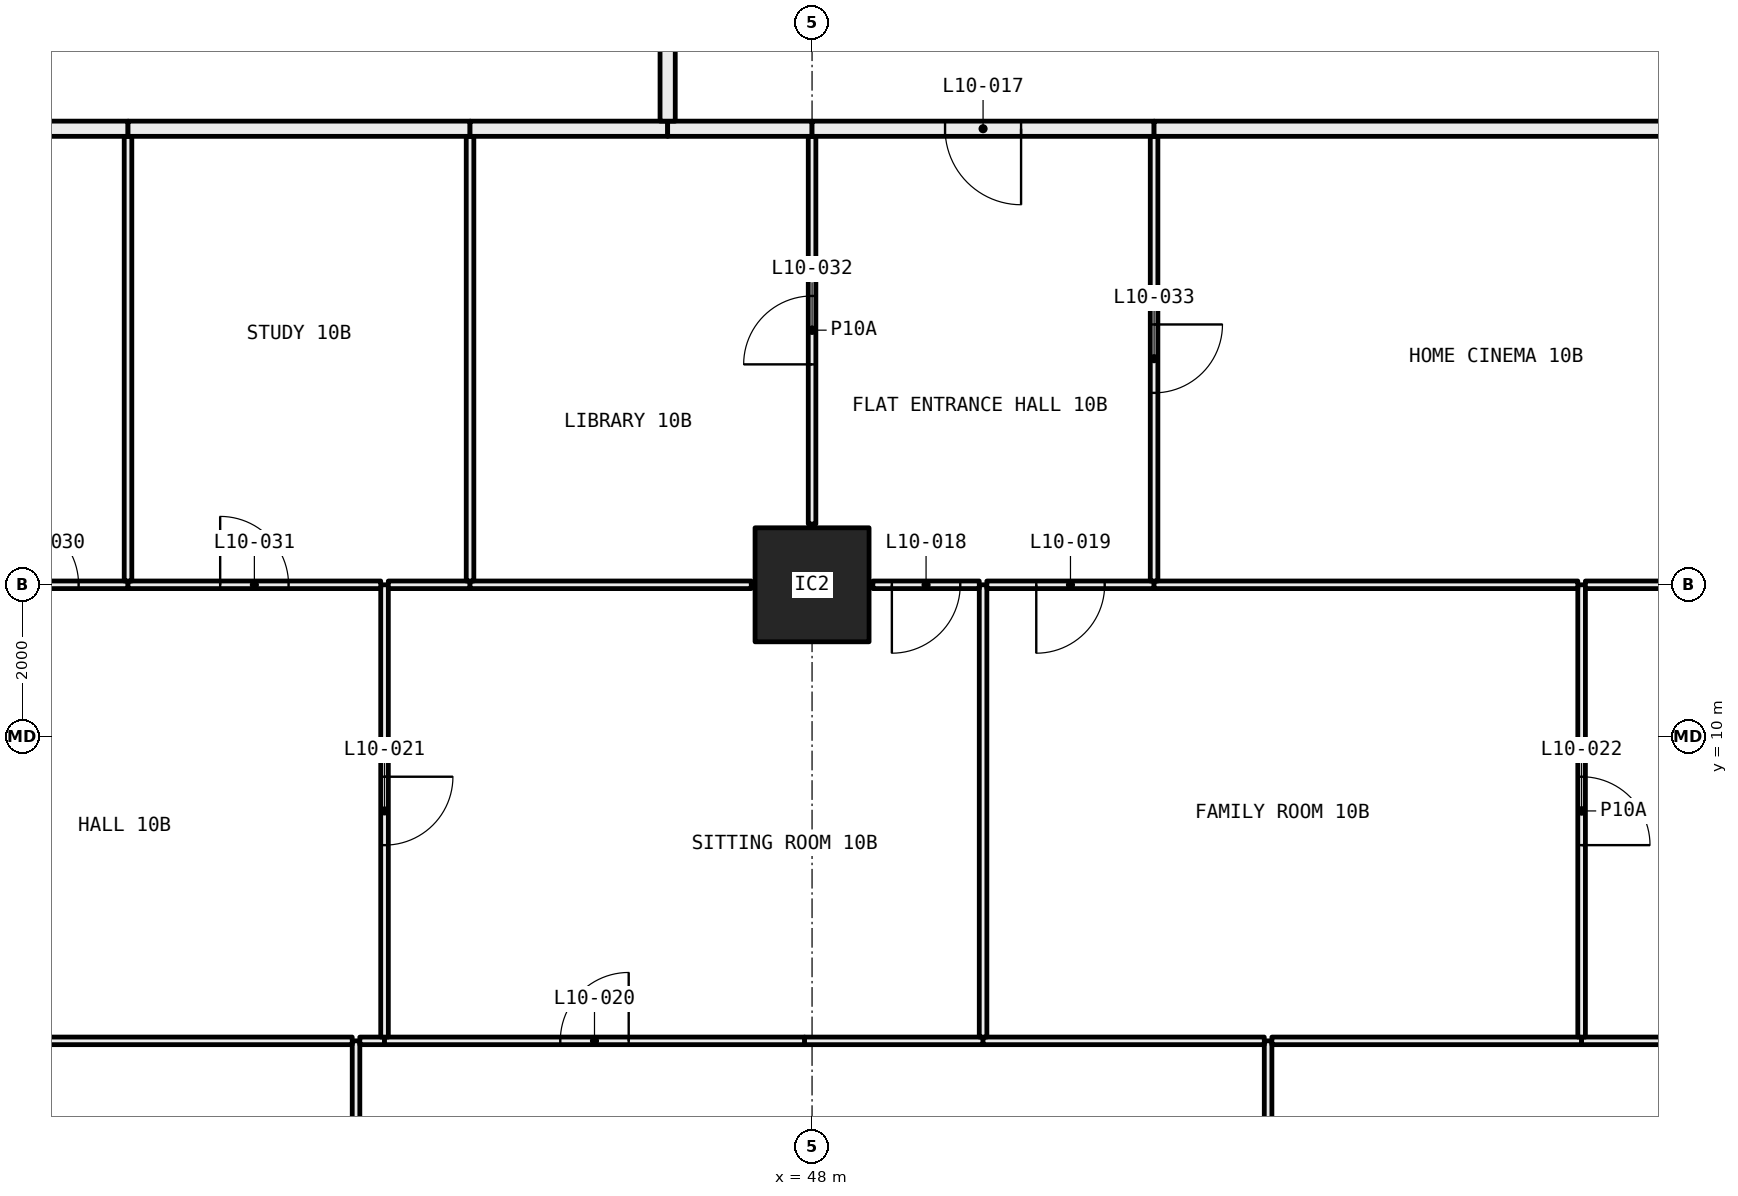
"""IFC4 building model, lengths in metres.
Left out: names, types, materials, properties, quantities, classifications, styles, units other than length and angle.
Written with IfcOpenShell. Run it as: python <this file> out.ifc"""

import sys

from ifc_helpers import new_model, si_unit, direction, frame, frame_2d, origin, origin_2d, place, context, subcontext, project, spatial, rectangle, hollow_rectangle, extrude, element, fill, save


model = new_model("IFC4")
c1 = context("Model", 3, precision=1e-05, world=origin(), true_north=direction((0.0, 1.0)))
c2 = subcontext(c1, "Body", "Model", "MODEL_VIEW")
j1 = project(units=[si_unit("LENGTHUNIT", "METRE"), si_unit("PLANEANGLEUNIT", "RADIAN")], contexts=[c1])
p1 = place(None, origin())
s1 = spatial("IfcSite", under=j1, at=p1, CompositionType="ELEMENT")
p2 = place(p1, origin())
s2 = spatial("IfcBuilding", under=s1, at=p2, CompositionType="ELEMENT")
p3 = place(p2, frame((0.0, 0.0, 47.25)))
s3 = spatial("IfcBuildingStorey", under=s2, at=p3, CompositionType="ELEMENT", Elevation=47.25)
p4 = place(p3, frame((48.0, 12.0, 0.0), z_axis=(0.0, 0.0, 1.0), x_axis=(1.0, 0.0, 0.0)))
e1 = element("IfcColumn", 1, at=p4, inside=s3, PredefinedType="COLUMN", context=c2, shape_type="SweptSolid", body=[
    extrude(hollow_rectangle(XDim=1.5, YDim=1.5, WallThickness=0.065, at=origin_2d()), origin(), (0.0, 0.0, 1.0), 3.05),
])
p5 = place(p3, frame((42.0, 0.72, 0.0), z_axis=(0.0, 0.0, 1.0), x_axis=(0.0, 1.0, 0.0)))
e2 = element("IfcWall", 2, at=p5, inside=s3, PredefinedType="PARTITIONING", context=c2, shape_type="SweptSolid", body=[
    extrude(rectangle(XDim=5.28, YDim=0.1, at=frame_2d((2.64, 0.0))), origin(), (0.0, 0.0, 1.0), 3.05),
])
p6 = place(p5, frame((2.19, 0.0, 0.0)))
e3 = element("IfcOpeningElement", 3, at=p6, cuts=e2, PredefinedType="OPENING", context=c2, shape_type="SweptSolid", body=[
    extrude(rectangle(XDim=0.9, YDim=2.1, at=frame_2d((0.45, 1.05))), frame((0.0, 0.06, 0.0), z_axis=(0.0, -1.0, 0.0), x_axis=(1.0, 0.0, 0.0)), (0.0, 0.0, 1.0), 0.12),
])
p7 = place(p3, frame((41.95, 6.0, 0.0), z_axis=(0.0, 0.0, 1.0), x_axis=(-1.0, 0.0, 0.0)))
e4 = element("IfcWall", 4, at=p7, inside=s3, PredefinedType="PARTITIONING", context=c2, shape_type="SweptSolid", body=[
    extrude(rectangle(XDim=5.9, YDim=0.1, at=frame_2d((2.95, 0.0))), origin(), (0.0, 0.0, 1.0), 2.45),
])
p8 = place(p3, frame((54.0, 0.72, 0.0), z_axis=(0.0, 0.0, 1.0), x_axis=(0.0, 1.0, 0.0)))
e5 = element("IfcWall", 5, at=p8, inside=s3, PredefinedType="PARTITIONING", context=c2, shape_type="SweptSolid", body=[
    extrude(rectangle(XDim=5.28, YDim=0.1, at=frame_2d((2.64, 0.0))), origin(), (0.0, 0.0, 1.0), 3.05),
])
p9 = place(p8, frame((2.19, 0.0, 0.0)))
e6 = element("IfcOpeningElement", 6, at=p9, cuts=e5, PredefinedType="OPENING", context=c2, shape_type="SweptSolid", body=[
    extrude(rectangle(XDim=0.9, YDim=2.1, at=frame_2d((0.45, 1.05))), frame((0.0, 0.06, 0.0), z_axis=(0.0, -1.0, 0.0), x_axis=(1.0, 0.0, 0.0)), (0.0, 0.0, 1.0), 0.12),
])
p10 = place(p3, frame((42.375, 6.0, 0.0), z_axis=(0.0, 0.0, 1.0), x_axis=(-1.0, 0.0, 0.0)))
e7 = element("IfcWall", 7, at=p10, inside=s3, PredefinedType="PARTITIONING", context=c2, shape_type="SweptSolid", body=[
    extrude(rectangle(XDim=0.325, YDim=0.1, at=frame_2d((0.163, 0.0))), origin(), (0.0, 0.0, 1.0), 3.05),
])
p11 = place(p3, frame((50.25, 6.0, 0.0), z_axis=(0.0, 0.0, 1.0), x_axis=(-1.0, 0.0, 0.0)))
e8 = element("IfcWall", 8, at=p11, inside=s3, PredefinedType="PARTITIONING", context=c2, shape_type="SweptSolid", body=[
    extrude(rectangle(XDim=2.35, YDim=0.1, at=frame_2d((1.175, 0.0))), origin(), (0.0, 0.0, 1.0), 2.45),
])
p12 = place(p3, frame((47.9, 6.0, 0.0), z_axis=(0.0, 0.0, 1.0), x_axis=(-1.0, 0.0, 0.0)))
e9 = element("IfcWall", 9, at=p12, inside=s3, PredefinedType="PARTITIONING", context=c2, shape_type="SweptSolid", body=[
    extrude(rectangle(XDim=5.525, YDim=0.1, at=frame_2d((2.762, 0.0))), origin(), (0.0, 0.0, 1.0), 3.05),
])
p13 = place(p12, frame((2.312, 0.0, 0.0)))
e10 = element("IfcOpeningElement", 10, at=p13, cuts=e9, PredefinedType="OPENING", context=c2, shape_type="SweptSolid", body=[
    extrude(rectangle(XDim=0.9, YDim=2.1, at=frame_2d((0.45, 1.05))), frame((0.0, 0.06, 0.0), z_axis=(0.0, -1.0, 0.0), x_axis=(1.0, 0.0, 0.0)), (0.0, 0.0, 1.0), 0.12),
])
p14 = place(p3, frame((53.95, 6.0, 0.0), z_axis=(0.0, 0.0, 1.0), x_axis=(-1.0, 0.0, 0.0)))
e11 = element("IfcWall", 11, at=p14, inside=s3, PredefinedType="PARTITIONING", context=c2, shape_type="SweptSolid", body=[
    extrude(rectangle(XDim=3.7, YDim=0.1, at=frame_2d((1.85, 0.0))), origin(), (0.0, 0.0, 1.0), 3.05),
])
p15 = place(p3, frame((58.125, 6.0, 0.0), z_axis=(0.0, 0.0, 1.0), x_axis=(-1.0, 0.0, 0.0)))
e12 = element("IfcWall", 12, at=p15, inside=s3, PredefinedType="PARTITIONING", context=c2, shape_type="SweptSolid", body=[
    extrude(rectangle(XDim=4.075, YDim=0.1, at=frame_2d((2.038, 0.0))), origin(), (0.0, 0.0, 1.0), 3.05),
])
p16 = place(p3, frame((59.95, 6.0, 0.0), z_axis=(0.0, 0.0, 1.0), x_axis=(-1.0, 0.0, 0.0)))
e13 = element("IfcWall", 13, at=p16, inside=s3, PredefinedType="PARTITIONING", context=c2, shape_type="SweptSolid", body=[
    extrude(rectangle(XDim=1.825, YDim=0.1, at=frame_2d((0.913, 0.0))), origin(), (0.0, 0.0, 1.0), 2.45),
])
p17 = place(p3, frame((42.375, 6.05, 0.0), z_axis=(0.0, 0.0, 1.0), x_axis=(0.0, 1.0, 0.0)))
e14 = element("IfcWall", 14, at=p17, inside=s3, PredefinedType="PARTITIONING", context=c2, shape_type="SweptSolid", body=[
    extrude(rectangle(XDim=5.95, YDim=0.1, at=frame_2d((2.975, 0.0))), origin(), (0.0, 0.0, 1.0), 2.45),
])
p18 = place(p17, frame((2.525, 0.0, 0.0)))
e15 = element("IfcOpeningElement", 15, at=p18, cuts=e14, PredefinedType="OPENING", context=c2, shape_type="SweptSolid", body=[
    extrude(rectangle(XDim=0.9, YDim=2.1, at=frame_2d((0.45, 1.05))), frame((0.0, 0.06, 0.0), z_axis=(0.0, -1.0, 0.0), x_axis=(1.0, 0.0, 0.0)), (0.0, 0.0, 1.0), 0.12),
])
p19 = place(p3, frame((39.0, 12.0, 0.0), z_axis=(0.0, 0.0, 1.0), x_axis=(-1.0, 0.0, 0.0)))
e16 = element("IfcWall", 16, at=p19, inside=s3, PredefinedType="PARTITIONING", context=c2, shape_type="SweptSolid", body=[
    extrude(rectangle(XDim=2.2, YDim=0.1, at=frame_2d((1.1, 0.0))), origin(), (0.0, 0.0, 1.0), 2.45),
])
p20 = place(p19, frame((0.65, 0.0, 0.0)))
e17 = element("IfcOpeningElement", 17, at=p20, cuts=e16, PredefinedType="OPENING", context=c2, shape_type="SweptSolid", body=[
    extrude(rectangle(XDim=0.9, YDim=2.1, at=frame_2d((0.45, 1.05))), frame((0.0, 0.06, 0.0), z_axis=(0.0, -1.0, 0.0), x_axis=(1.0, 0.0, 0.0)), (0.0, 0.0, 1.0), 0.12),
])
p21 = place(p3, frame((42.325, 12.0, 0.0), z_axis=(0.0, 0.0, 1.0), x_axis=(-1.0, 0.0, 0.0)))
e18 = element("IfcWall", 18, at=p21, inside=s3, PredefinedType="PARTITIONING", context=c2, shape_type="SweptSolid", body=[
    extrude(rectangle(XDim=3.325, YDim=0.1, at=frame_2d((1.663, 0.0))), origin(), (0.0, 0.0, 1.0), 2.45),
])
p22 = place(p21, frame((1.212, 0.0, 0.0)))
e19 = element("IfcOpeningElement", 19, at=p22, cuts=e18, PredefinedType="OPENING", context=c2, shape_type="SweptSolid", body=[
    extrude(rectangle(XDim=0.9, YDim=2.1, at=frame_2d((0.45, 1.05))), frame((0.0, 0.06, 0.0), z_axis=(0.0, -1.0, 0.0), x_axis=(1.0, 0.0, 0.0)), (0.0, 0.0, 1.0), 0.12),
])
p23 = place(p3, frame((50.25, 6.05, 0.0), z_axis=(0.0, 0.0, 1.0), x_axis=(0.0, 1.0, 0.0)))
e20 = element("IfcWall", 20, at=p23, inside=s3, PredefinedType="PARTITIONING", context=c2, shape_type="SweptSolid", body=[
    extrude(rectangle(XDim=5.95, YDim=0.1, at=frame_2d((2.975, 0.0))), origin(), (0.0, 0.0, 1.0), 2.45),
])
p24 = place(p3, frame((43.5, 12.0, 0.0), z_axis=(0.0, 0.0, 1.0), x_axis=(-1.0, 0.0, 0.0)))
e21 = element("IfcWall", 21, at=p24, inside=s3, PredefinedType="PARTITIONING", context=c2, shape_type="SweptSolid", body=[
    extrude(rectangle(XDim=1.075, YDim=0.1, at=frame_2d((0.538, 0.0))), origin(), (0.0, 0.0, 1.0), 2.45),
])
p25 = place(p3, frame((47.2, 12.0, 0.0), z_axis=(0.0, 0.0, 1.0), x_axis=(-1.0, 0.0, 0.0)))
e22 = element("IfcWall", 22, at=p25, inside=s3, PredefinedType="PARTITIONING", context=c2, shape_type="SweptSolid", body=[
    extrude(rectangle(XDim=3.7, YDim=0.1, at=frame_2d((1.85, 0.0))), origin(), (0.0, 0.0, 1.0), 2.45),
])
p26 = place(p3, frame((50.2, 12.0, 0.0), z_axis=(0.0, 0.0, 1.0), x_axis=(-1.0, 0.0, 0.0)))
e23 = element("IfcWall", 23, at=p26, inside=s3, PredefinedType="PARTITIONING", context=c2, shape_type="SweptSolid", body=[
    extrude(rectangle(XDim=1.4, YDim=0.1, at=frame_2d((0.7, 0.0))), origin(), (0.0, 0.0, 1.0), 2.45),
])
p27 = place(p26, frame((0.25, 0.0, 0.0)))
e24 = element("IfcOpeningElement", 24, at=p27, cuts=e23, PredefinedType="OPENING", context=c2, shape_type="SweptSolid", body=[
    extrude(rectangle(XDim=0.9, YDim=2.1, at=frame_2d((0.45, 1.05))), frame((0.0, 0.06, 0.0), z_axis=(0.0, -1.0, 0.0), x_axis=(1.0, 0.0, 0.0)), (0.0, 0.0, 1.0), 0.12),
])
p28 = place(p3, frame((58.125, 6.05, 0.0), z_axis=(0.0, 0.0, 1.0), x_axis=(0.0, 1.0, 0.0)))
e25 = element("IfcWall", 25, at=p28, inside=s3, PredefinedType="PARTITIONING", context=c2, shape_type="SweptSolid", body=[
    extrude(rectangle(XDim=5.95, YDim=0.1, at=frame_2d((2.975, 0.0))), origin(), (0.0, 0.0, 1.0), 2.45),
])
p29 = place(p28, frame((2.525, 0.0, 0.0)))
e26 = element("IfcOpeningElement", 26, at=p29, cuts=e25, PredefinedType="OPENING", context=c2, shape_type="SweptSolid", body=[
    extrude(rectangle(XDim=0.9, YDim=2.1, at=frame_2d((0.45, 1.05))), frame((0.0, 0.06, 0.0), z_axis=(0.0, -1.0, 0.0), x_axis=(1.0, 0.0, 0.0)), (0.0, 0.0, 1.0), 0.12),
])
p30 = place(p3, frame((52.5, 12.0, 0.0), z_axis=(0.0, 0.0, 1.0), x_axis=(-1.0, 0.0, 0.0)))
e27 = element("IfcWall", 27, at=p30, inside=s3, PredefinedType="PARTITIONING", context=c2, shape_type="SweptSolid", body=[
    extrude(rectangle(XDim=2.2, YDim=0.1, at=frame_2d((1.1, 0.0))), origin(), (0.0, 0.0, 1.0), 2.45),
])
p31 = place(p30, frame((0.65, 0.0, 0.0)))
e28 = element("IfcOpeningElement", 28, at=p31, cuts=e27, PredefinedType="OPENING", context=c2, shape_type="SweptSolid", body=[
    extrude(rectangle(XDim=0.9, YDim=2.1, at=frame_2d((0.45, 1.05))), frame((0.0, 0.06, 0.0), z_axis=(0.0, -1.0, 0.0), x_axis=(1.0, 0.0, 0.0)), (0.0, 0.0, 1.0), 0.12),
])
p32 = place(p3, frame((58.075, 12.0, 0.0), z_axis=(0.0, 0.0, 1.0), x_axis=(-1.0, 0.0, 0.0)))
e29 = element("IfcWall", 29, at=p32, inside=s3, PredefinedType="PARTITIONING", context=c2, shape_type="SweptSolid", body=[
    extrude(rectangle(XDim=5.575, YDim=0.1, at=frame_2d((2.788, 0.0))), origin(), (0.0, 0.0, 1.0), 2.45),
])
p33 = place(p3, frame((59.2, 12.0, 0.0), z_axis=(0.0, 0.0, 1.0), x_axis=(-1.0, 0.0, 0.0)))
e30 = element("IfcWall", 30, at=p33, inside=s3, PredefinedType="PARTITIONING", context=c2, shape_type="SweptSolid", body=[
    extrude(rectangle(XDim=1.025, YDim=0.1, at=frame_2d((0.512, 0.0))), origin(), (0.0, 0.0, 1.0), 2.45),
])
p34 = place(p3, frame((39.0, 12.05, 0.0), z_axis=(0.0, 0.0, 1.0), x_axis=(0.0, 1.0, 0.0)))
e31 = element("IfcWall", 31, at=p34, inside=s3, PredefinedType="PARTITIONING", context=c2, shape_type="SweptSolid", body=[
    extrude(rectangle(XDim=5.85, YDim=0.1, at=frame_2d((2.925, 0.0))), origin(), (0.0, 0.0, 1.0), 2.45),
])
p35 = place(p3, frame((39.0, 18.0, 0.0), z_axis=(0.0, 0.0, 1.0), x_axis=(-1.0, 0.0, 0.0)))
e32 = element("IfcWall", 32, at=p35, inside=s3, PredefinedType="PARTITIONING", context=c2, shape_type="SweptSolid", body=[
    extrude(rectangle(XDim=3.0, YDim=0.2, at=frame_2d((1.5, 0.0))), origin(), (0.0, 0.0, 1.0), 2.45),
])
p36 = place(p3, frame((43.5, 12.05, 0.0), z_axis=(0.0, 0.0, 1.0), x_axis=(0.0, 1.0, 0.0)))
e33 = element("IfcWall", 33, at=p36, inside=s3, PredefinedType="PARTITIONING", context=c2, shape_type="SweptSolid", body=[
    extrude(rectangle(XDim=5.85, YDim=0.1, at=frame_2d((2.925, 0.0))), origin(), (0.0, 0.0, 1.0), 2.45),
])
p37 = place(p3, frame((43.5, 18.0, 0.0), z_axis=(0.0, 0.0, 1.0), x_axis=(-1.0, 0.0, 0.0)))
e34 = element("IfcWall", 34, at=p37, inside=s3, PredefinedType="PARTITIONING", context=c2, shape_type="SweptSolid", body=[
    extrude(rectangle(XDim=4.5, YDim=0.2, at=frame_2d((2.25, 0.0))), origin(), (0.0, 0.0, 1.0), 3.05),
])
p38 = place(p3, frame((48.0, 12.8, 0.0), z_axis=(0.0, 0.0, 1.0), x_axis=(0.0, 1.0, 0.0)))
e35 = element("IfcWall", 35, at=p38, inside=s3, PredefinedType="PARTITIONING", context=c2, shape_type="SweptSolid", body=[
    extrude(rectangle(XDim=5.1, YDim=0.1, at=frame_2d((2.55, 0.0))), origin(), (0.0, 0.0, 1.0), 3.05),
])
p39 = place(p38, frame((2.1, 0.0, 0.0)))
e36 = element("IfcOpeningElement", 36, at=p39, cuts=e35, PredefinedType="OPENING", context=c2, shape_type="SweptSolid", body=[
    extrude(rectangle(XDim=0.9, YDim=2.1, at=frame_2d((0.45, 1.05))), frame((0.0, 0.06, 0.0), z_axis=(0.0, -1.0, 0.0), x_axis=(1.0, 0.0, 0.0)), (0.0, 0.0, 1.0), 0.12),
])
p40 = place(p3, frame((46.1, 18.0, 0.0), z_axis=(0.0, 0.0, 1.0), x_axis=(-1.0, 0.0, 0.0)))
e37 = element("IfcWall", 37, at=p40, inside=s3, PredefinedType="PARTITIONING", context=c2, shape_type="SweptSolid", body=[
    extrude(rectangle(XDim=2.6, YDim=0.2, at=frame_2d((1.3, 0.0))), origin(), (0.0, 0.0, 1.0), 3.05),
])
p41 = place(p3, frame((48.0, 18.0, 0.0), z_axis=(0.0, 0.0, 1.0), x_axis=(-1.0, 0.0, 0.0)))
e38 = element("IfcWall", 38, at=p41, inside=s3, PredefinedType="PARTITIONING", context=c2, shape_type="SweptSolid", body=[
    extrude(rectangle(XDim=1.9, YDim=0.2, at=frame_2d((0.95, 0.0))), origin(), (0.0, 0.0, 1.0), 3.05),
])
p42 = place(p3, frame((52.5, 12.05, 0.0), z_axis=(0.0, 0.0, 1.0), x_axis=(0.0, 1.0, 0.0)))
e39 = element("IfcWall", 39, at=p42, inside=s3, PredefinedType="PARTITIONING", context=c2, shape_type="SweptSolid", body=[
    extrude(rectangle(XDim=5.85, YDim=0.1, at=frame_2d((2.925, 0.0))), origin(), (0.0, 0.0, 1.0), 2.45),
])
p43 = place(p42, frame((2.475, 0.0, 0.0)))
e40 = element("IfcOpeningElement", 40, at=p43, cuts=e39, PredefinedType="OPENING", context=c2, shape_type="SweptSolid", body=[
    extrude(rectangle(XDim=0.9, YDim=2.1, at=frame_2d((0.45, 1.05))), frame((0.0, 0.06, 0.0), z_axis=(0.0, -1.0, 0.0), x_axis=(1.0, 0.0, 0.0)), (0.0, 0.0, 1.0), 0.12),
])
p44 = place(p3, frame((52.5, 18.0, 0.0), z_axis=(0.0, 0.0, 1.0), x_axis=(-1.0, 0.0, 0.0)))
e41 = element("IfcWall", 41, at=p44, inside=s3, PredefinedType="PARTITIONING", context=c2, shape_type="SweptSolid", body=[
    extrude(rectangle(XDim=4.5, YDim=0.2, at=frame_2d((2.25, 0.0))), origin(), (0.0, 0.0, 1.0), 3.05),
])
p45 = place(p44, frame((1.75, 0.0, 0.0)))
e42 = element("IfcOpeningElement", 42, at=p45, cuts=e41, PredefinedType="OPENING", context=c2, shape_type="SweptSolid", body=[
    extrude(rectangle(XDim=1.0, YDim=2.1, at=frame_2d((0.5, 1.05))), frame((0.0, 0.11, 0.0), z_axis=(0.0, -1.0, 0.0), x_axis=(1.0, 0.0, 0.0)), (0.0, 0.0, 1.0), 0.22),
])
p46 = place(p3, frame((61.5, 18.0, 0.0), z_axis=(0.0, 0.0, 1.0), x_axis=(-1.0, 0.0, 0.0)))
e43 = element("IfcWall", 43, at=p46, inside=s3, PredefinedType="PARTITIONING", context=c2, shape_type="SweptSolid", body=[
    extrude(rectangle(XDim=9.0, YDim=0.2, at=frame_2d((4.5, 0.0))), origin(), (0.0, 0.0, 1.0), 3.05),
])
p47 = place(p3, frame((46.1, 18.1, 0.0), z_axis=(0.0, 0.0, 1.0), x_axis=(0.0, 1.0, 0.0)))
e44 = element("IfcWall", 44, at=p47, inside=s3, PredefinedType="PARTITIONING", context=c2, shape_type="SweptSolid", body=[
    extrude(rectangle(XDim=6.2, YDim=0.2, at=frame_2d((3.1, 0.0))), origin(), (0.0, 0.0, 1.0), 2.45),
])
p48 = place(p45, origin())
e45 = element("IfcDoor", 45, at=p48, inside=s3, OperationType="SINGLE_SWING_RIGHT", PredefinedType="DOOR", context=c2, shape_type="SweptSolid", body=[
    extrude(rectangle(XDim=1.0, YDim=2.1, at=frame_2d((0.5, 1.05))), frame((0.0, 0.025, 0.0), z_axis=(0.0, -1.0, 0.0), x_axis=(1.0, 0.0, 0.0)), (0.0, 0.0, 1.0), 0.05),
])
fill(e42, e45)
p49 = place(p27, origin())
e46 = element("IfcDoor", 46, at=p49, inside=s3, OperationType="SINGLE_SWING_LEFT", PredefinedType="DOOR", context=c2, shape_type="SweptSolid", body=[
    extrude(rectangle(XDim=0.9, YDim=2.1, at=frame_2d((0.45, 1.05))), frame((0.0, 0.025, 0.0), z_axis=(0.0, -1.0, 0.0), x_axis=(1.0, 0.0, 0.0)), (0.0, 0.0, 1.0), 0.05),
])
fill(e24, e46)
p50 = place(p31, origin())
e47 = element("IfcDoor", 47, at=p50, inside=s3, OperationType="SINGLE_SWING_LEFT", PredefinedType="DOOR", context=c2, shape_type="SweptSolid", body=[
    extrude(rectangle(XDim=0.9, YDim=2.1, at=frame_2d((0.45, 1.05))), frame((0.0, 0.025, 0.0), z_axis=(0.0, -1.0, 0.0), x_axis=(1.0, 0.0, 0.0)), (0.0, 0.0, 1.0), 0.05),
])
fill(e28, e47)
p51 = place(p13, frame((0.9, 0.0, 0.0), x_axis=(-1.0, 0.0, 0.0)))
e48 = element("IfcDoor", 48, at=p51, inside=s3, OperationType="SINGLE_SWING_LEFT", PredefinedType="DOOR", context=c2, shape_type="SweptSolid", body=[
    extrude(rectangle(XDim=0.9, YDim=2.1, at=frame_2d((0.45, 1.05))), frame((0.0, 0.025, 0.0), z_axis=(0.0, -1.0, 0.0), x_axis=(1.0, 0.0, 0.0)), (0.0, 0.0, 1.0), 0.05),
])
fill(e10, e48)
p52 = place(p18, frame((0.9, 0.0, 0.0), x_axis=(-1.0, 0.0, 0.0)))
e49 = element("IfcDoor", 49, at=p52, inside=s3, OperationType="SINGLE_SWING_RIGHT", PredefinedType="DOOR", context=c2, shape_type="SweptSolid", body=[
    extrude(rectangle(XDim=0.9, YDim=2.1, at=frame_2d((0.45, 1.05))), frame((0.0, 0.025, 0.0), z_axis=(0.0, -1.0, 0.0), x_axis=(1.0, 0.0, 0.0)), (0.0, 0.0, 1.0), 0.05),
])
fill(e15, e49)
p53 = place(p29, frame((0.9, 0.0, 0.0), x_axis=(-1.0, 0.0, 0.0)))
e50 = element("IfcDoor", 50, at=p53, inside=s3, OperationType="SINGLE_SWING_LEFT", PredefinedType="DOOR", context=c2, shape_type="SweptSolid", body=[
    extrude(rectangle(XDim=0.9, YDim=2.1, at=frame_2d((0.45, 1.05))), frame((0.0, 0.025, 0.0), z_axis=(0.0, -1.0, 0.0), x_axis=(1.0, 0.0, 0.0)), (0.0, 0.0, 1.0), 0.05),
])
fill(e26, e50)
p54 = place(p20, frame((0.9, 0.0, 0.0), x_axis=(-1.0, 0.0, 0.0)))
e51 = element("IfcDoor", 51, at=p54, inside=s3, OperationType="SINGLE_SWING_RIGHT", PredefinedType="DOOR", context=c2, shape_type="SweptSolid", body=[
    extrude(rectangle(XDim=0.9, YDim=2.1, at=frame_2d((0.45, 1.05))), frame((0.0, 0.025, 0.0), z_axis=(0.0, -1.0, 0.0), x_axis=(1.0, 0.0, 0.0)), (0.0, 0.0, 1.0), 0.05),
])
fill(e17, e51)
p55 = place(p22, frame((0.9, 0.0, 0.0), x_axis=(-1.0, 0.0, 0.0)))
e52 = element("IfcDoor", 52, at=p55, inside=s3, OperationType="SINGLE_SWING_RIGHT", PredefinedType="DOOR", context=c2, shape_type="SweptSolid", body=[
    extrude(rectangle(XDim=0.9, YDim=2.1, at=frame_2d((0.45, 1.05))), frame((0.0, 0.025, 0.0), z_axis=(0.0, -1.0, 0.0), x_axis=(1.0, 0.0, 0.0)), (0.0, 0.0, 1.0), 0.05),
])
fill(e19, e52)
p56 = place(p39, origin())
e53 = element("IfcDoor", 53, at=p56, inside=s3, OperationType="SINGLE_SWING_RIGHT", PredefinedType="DOOR", context=c2, shape_type="SweptSolid", body=[
    extrude(rectangle(XDim=0.9, YDim=2.1, at=frame_2d((0.45, 1.05))), frame((0.0, 0.025, 0.0), z_axis=(0.0, -1.0, 0.0), x_axis=(1.0, 0.0, 0.0)), (0.0, 0.0, 1.0), 0.05),
])
fill(e36, e53)
p57 = place(p43, frame((0.9, 0.0, 0.0), x_axis=(-1.0, 0.0, 0.0)))
e54 = element("IfcDoor", 54, at=p57, inside=s3, OperationType="SINGLE_SWING_RIGHT", PredefinedType="DOOR", context=c2, shape_type="SweptSolid", body=[
    extrude(rectangle(XDim=0.9, YDim=2.1, at=frame_2d((0.45, 1.05))), frame((0.0, 0.025, 0.0), z_axis=(0.0, -1.0, 0.0), x_axis=(1.0, 0.0, 0.0)), (0.0, 0.0, 1.0), 0.05),
])
fill(e40, e54)
save(model, sys.argv[1])
